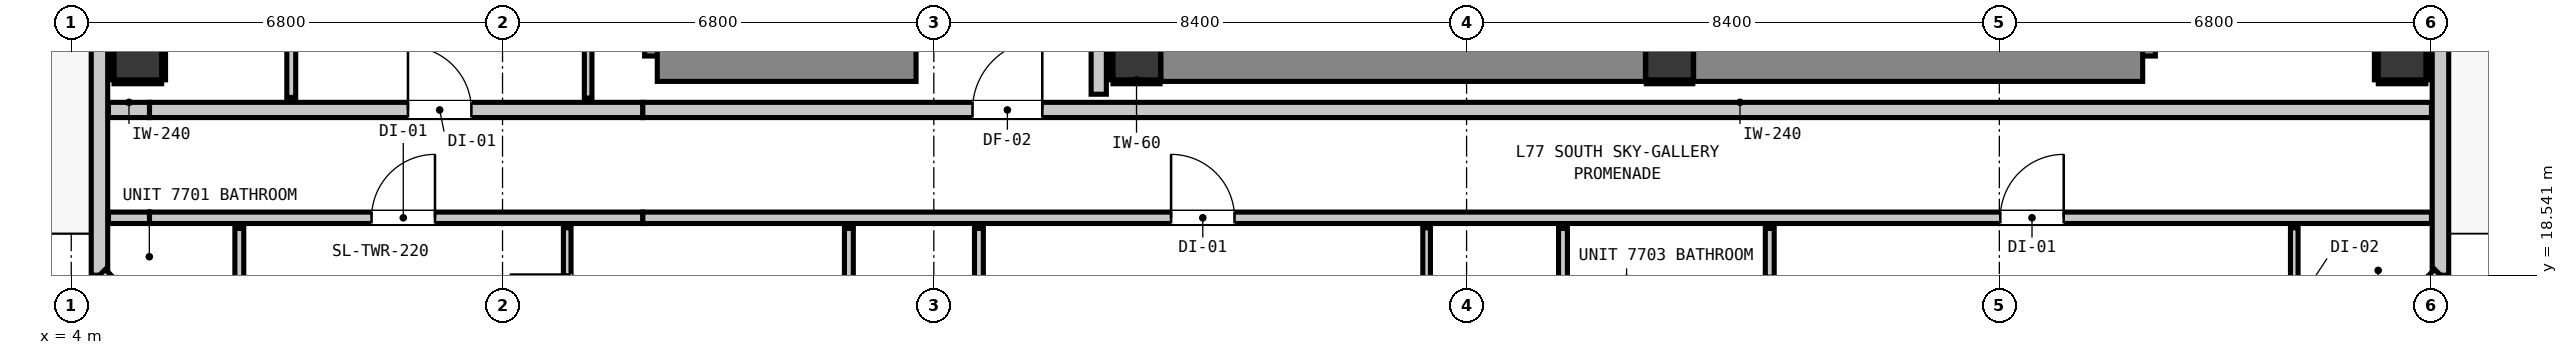
"""IFC4 building model, lengths in metres.
Left out: names, types, materials, properties, quantities, classifications, styles, units other than length and angle.
Written with IfcOpenShell. Run it as: python <this file> out.ifc"""

import sys

from ifc_helpers import new_model, si_unit, direction, frame, frame_2d, origin, origin_2d, place, context, subcontext, project, spatial, rectangle, extrude, element, fill, save


model = new_model("IFC4")
c1 = context("Model", 3, precision=1e-05, world=origin(), true_north=direction((0.0, 1.0)))
c2 = subcontext(c1, "Body", "Model", "MODEL_VIEW")
j1 = project(units=[si_unit("LENGTHUNIT", "METRE"), si_unit("PLANEANGLEUNIT", "RADIAN")], contexts=[c1])
p1 = place(None, origin())
s1 = spatial("IfcSite", under=j1, at=p1, CompositionType="ELEMENT")
p2 = place(p1, origin())
s2 = spatial("IfcBuilding", under=s1, at=p2, CompositionType="ELEMENT")
p3 = place(p2, frame((0.0, 0.0, 265.56)))
s3 = spatial("IfcBuildingStorey", under=s2, at=p3, CompositionType="ELEMENT", Elevation=265.56)
for number, where, z_axis, x_axis in (
    (1, (20.8, 22.0, 0.0), (0.0, 0.0, 1.0), (1.0, 0.0, 0.0)),
    (2, (29.2, 22.0, 0.0), (0.0, 0.0, 1.0), (1.0, 0.0, 0.0)),
):
    element("IfcColumn", number, at=place(p3, frame(where, z_axis=z_axis, x_axis=x_axis)), inside=s3, PredefinedType="COLUMN", context=c2, shape_type="SweptSolid", body=[
        extrude(rectangle(XDim=0.75, YDim=0.75, at=origin_2d()), origin(), (0.0, 0.0, 1.0), 3.32),
    ])
p4 = place(p3, frame((13.44, 22.0, 0.0), z_axis=(0.0, 0.0, 1.0), x_axis=(0.0, 1.0, 0.0)))
e3 = element("IfcWall", 3, at=p4, inside=s3, PredefinedType="SHEAR", context=c2, shape_type="SweptSolid", body=[
    extrude(rectangle(XDim=8.32, YDim=0.8, at=frame_2d((4.16, 0.0))), origin(), (0.0, 0.0, 1.0), 3.32),
])
p5 = place(p3, frame((13.24, 22.0, 0.0), z_axis=(0.0, 0.0, 1.0), x_axis=(1.0, 0.0, 0.0)))
e4 = element("IfcWall", 4, at=p5, inside=s3, PredefinedType="SHEAR", context=c2, shape_type="SweptSolid", body=[
    extrude(rectangle(XDim=4.08, YDim=0.8, at=frame_2d((2.04, 0.0))), origin(), (0.0, 0.0, 1.0), 3.32),
])
p6 = place(p3, frame((36.46, 22.0, 0.0), z_axis=(0.0, 0.0, 1.0), x_axis=(0.0, 1.0, 0.0)))
e5 = element("IfcWall", 5, at=p6, inside=s3, PredefinedType="SHEAR", context=c2, shape_type="SweptSolid", body=[
    extrude(rectangle(XDim=8.32, YDim=0.8, at=frame_2d((4.16, 0.0))), origin(), (0.0, 0.0, 1.0), 3.32),
])
p7 = place(p3, frame((29.58, 22.0, 0.0), z_axis=(0.0, 0.0, 1.0), x_axis=(1.0, 0.0, 0.0)))
e6 = element("IfcWall", 6, at=p7, inside=s3, PredefinedType="SHEAR", context=c2, shape_type="SweptSolid", body=[
    extrude(rectangle(XDim=7.08, YDim=0.8, at=frame_2d((3.54, 0.0))), origin(), (0.0, 0.0, 1.0), 3.32),
])
p8 = place(p3, frame((21.18, 22.0, 0.0), z_axis=(0.0, 0.0, 1.0), x_axis=(1.0, 0.0, 0.0)))
e7 = element("IfcWall", 7, at=p8, inside=s3, PredefinedType="SHEAR", context=c2, shape_type="SweptSolid", body=[
    extrude(rectangle(XDim=7.64, YDim=0.8, at=frame_2d((3.82, 0.0))), origin(), (0.0, 0.0, 1.0), 3.32),
])
for number, where, z_axis, x_axis in (
    (8, (5.05, 22.0, 0.0), (0.0, 0.0, 1.0), (1.0, 0.0, 0.0)),
    (9, (40.75, 22.0, 0.0), (0.0, 0.0, 1.0), (1.0, 0.0, 0.0)),
):
    element("IfcColumn", number, at=place(p3, frame(where, z_axis=z_axis, x_axis=x_axis)), inside=s3, PredefinedType="COLUMN", context=c2, shape_type="SweptSolid", body=[
        extrude(rectangle(XDim=0.75, YDim=0.75, at=origin_2d()), origin(), (0.0, 0.0, 1.0), 3.32),
    ])
p9 = place(p3, frame((4.445, 18.545, 0.0), z_axis=(0.0, 0.0, 1.0), x_axis=(0.0, 1.0, 0.0)))
e10 = element("IfcWall", 10, at=p9, inside=s3, PredefinedType="STANDARD", context=c2, shape_type="SweptSolid", body=[
    extrude(rectangle(XDim=30.31, YDim=0.26, at=frame_2d((15.155, 0.0))), origin(), (0.0, 0.0, 1.0), 3.1),
])
p10 = place(p9, frame((4.434, 0.0, 0.0)))
e11 = element("IfcOpeningElement", 11, at=p10, cuts=e10, PredefinedType="OPENING", context=c2, shape_type="SweptSolid", body=[
    extrude(rectangle(XDim=1.0, YDim=2.15, at=frame_2d((0.5, 1.075))), frame((0.0, 0.14, 0.0), z_axis=(0.0, -1.0, 0.0), x_axis=(1.0, 0.0, 0.0)), (0.0, 0.0, 1.0), 0.28),
])
p11 = place(p9, frame((28.241, 0.0, 0.85)))
e12 = element("IfcOpeningElement", 12, at=p11, cuts=e10, PredefinedType="OPENING", context=c2, shape_type="SweptSolid", body=[
    extrude(rectangle(XDim=1.05, YDim=1.65, at=frame_2d((0.525, 0.825))), frame((0.0, 0.14, 0.0), z_axis=(0.0, -1.0, 0.0), x_axis=(1.0, 0.0, 0.0)), (0.0, 0.0, 1.0), 0.28),
])
p12 = place(p9, frame((15.98, 0.0, 0.85)))
e13 = element("IfcOpeningElement", 13, at=p12, cuts=e10, PredefinedType="OPENING", context=c2, shape_type="SweptSolid", body=[
    extrude(rectangle(XDim=1.05, YDim=1.65, at=frame_2d((0.525, 0.825))), frame((0.0, 0.14, 0.0), z_axis=(0.0, -1.0, 0.0), x_axis=(1.0, 0.0, 0.0)), (0.0, 0.0, 1.0), 0.28),
])
p13 = place(p3, frame((41.355, 48.855, 0.0), z_axis=(0.0, 0.0, 1.0), x_axis=(0.0, -1.0, 0.0)))
e14 = element("IfcWall", 14, at=p13, inside=s3, PredefinedType="STANDARD", context=c2, shape_type="SweptSolid", body=[
    extrude(rectangle(XDim=30.31, YDim=0.26, at=frame_2d((15.155, 0.0))), origin(), (0.0, 0.0, 1.0), 3.1),
])
p14 = place(p13, frame((0.91, 0.0, 0.0)))
e15 = element("IfcOpeningElement", 15, at=p14, cuts=e14, PredefinedType="OPENING", context=c2, shape_type="SweptSolid", body=[
    extrude(rectangle(XDim=1.0, YDim=2.15, at=frame_2d((0.5, 1.075))), frame((0.0, 0.14, 0.0), z_axis=(0.0, -1.0, 0.0), x_axis=(1.0, 0.0, 0.0)), (0.0, 0.0, 1.0), 0.28),
])
p15 = place(p13, frame((3.932, 0.0, 0.85)))
e16 = element("IfcOpeningElement", 16, at=p15, cuts=e14, PredefinedType="OPENING", context=c2, shape_type="SweptSolid", body=[
    extrude(rectangle(XDim=1.05, YDim=1.65, at=frame_2d((0.525, 0.825))), frame((0.0, 0.14, 0.0), z_axis=(0.0, -1.0, 0.0), x_axis=(1.0, 0.0, 0.0)), (0.0, 0.0, 1.0), 0.28),
])
for number, where, z_axis, x_axis in (
    (17, (41.355, 18.545, 0.0), (0.0, 0.0, 1.0), (-0.707, -0.707, 0.0)),
    (18, (6.545, 16.445, 0.0), (0.0, 0.0, 1.0), (-0.707, 0.707, 0.0)),
):
    element("IfcWall", number, at=place(p3, frame(where, z_axis=z_axis, x_axis=x_axis)), inside=s3, PredefinedType="STANDARD", context=c2, shape_type="SweptSolid", body=[
        extrude(rectangle(XDim=2.97, YDim=0.26, at=frame_2d((1.485, 0.0))), origin(), (0.0, 0.0, 1.0), 3.1),
    ])
p16 = place(p3, frame((4.587, 21.15, 0.0), z_axis=(0.0, 0.0, 1.0), x_axis=(1.0, 0.0, 0.0)))
e19 = element("IfcWall", 19, at=p16, inside=s3, PredefinedType="PARTITIONING", context=c2, shape_type="SweptSolid", body=[
    extrude(rectangle(XDim=0.647, YDim=0.24, at=frame_2d((0.323, 0.0))), origin(), (0.0, 0.0, 1.0), 3.1),
])
p17 = place(p3, frame((5.234, 21.15, 0.0), z_axis=(0.0, 0.0, 1.0), x_axis=(1.0, 0.0, 0.0)))
e20 = element("IfcWall", 20, at=p17, inside=s3, PredefinedType="PARTITIONING", context=c2, shape_type="SweptSolid", body=[
    extrude(rectangle(XDim=7.778, YDim=0.24, at=frame_2d((3.889, 0.0))), origin(), (0.0, 0.0, 1.0), 2.477),
])
p18 = place(p17, frame((4.075, 0.0, 0.0)))
e21 = element("IfcOpeningElement", 21, at=p18, cuts=e20, PredefinedType="OPENING", context=c2, shape_type="SweptSolid", body=[
    extrude(rectangle(XDim=1.0, YDim=2.15, at=frame_2d((0.5, 1.075))), frame((0.0, 0.13, 0.0), z_axis=(0.0, -1.0, 0.0), x_axis=(1.0, 0.0, 0.0)), (0.0, 0.0, 1.0), 0.26),
])
p19 = place(p3, frame((13.012, 21.15, 0.0), z_axis=(0.0, 0.0, 1.0), x_axis=(1.0, 0.0, 0.0)))
e22 = element("IfcWall", 22, at=p19, inside=s3, PredefinedType="PARTITIONING", context=c2, shape_type="SweptSolid", body=[
    extrude(rectangle(XDim=28.201, YDim=0.24, at=frame_2d((14.101, 0.0))), origin(), (0.0, 0.0, 1.0), 3.1),
])
p20 = place(p19, frame((5.198, 0.0, 0.0)))
e23 = element("IfcOpeningElement", 23, at=p20, cuts=e22, PredefinedType="OPENING", context=c2, shape_type="SweptSolid", body=[
    extrude(rectangle(XDim=1.1, YDim=2.15, at=frame_2d((0.55, 1.075))), frame((0.0, 0.13, 0.0), z_axis=(0.0, -1.0, 0.0), x_axis=(1.0, 0.0, 0.0)), (0.0, 0.0, 1.0), 0.26),
])
p21 = place(p3, frame((4.587, 19.45, 0.0), z_axis=(0.0, 0.0, 1.0), x_axis=(1.0, 0.0, 0.0)))
e24 = element("IfcWall", 24, at=p21, inside=s3, PredefinedType="PARTITIONING", context=c2, shape_type="SweptSolid", body=[
    extrude(rectangle(XDim=0.647, YDim=0.18, at=frame_2d((0.323, 0.0))), origin(), (0.0, 0.0, 1.0), 3.1),
])
p22 = place(p3, frame((5.234, 19.45, 0.0), z_axis=(0.0, 0.0, 1.0), x_axis=(1.0, 0.0, 0.0)))
e25 = element("IfcWall", 25, at=p22, inside=s3, PredefinedType="PARTITIONING", context=c2, shape_type="SweptSolid", body=[
    extrude(rectangle(XDim=7.778, YDim=0.18, at=frame_2d((3.889, 0.0))), origin(), (0.0, 0.0, 1.0), 2.477),
])
p23 = place(p22, frame((3.501, 0.0, 0.0)))
e26 = element("IfcOpeningElement", 26, at=p23, cuts=e25, PredefinedType="OPENING", context=c2, shape_type="SweptSolid", body=[
    extrude(rectangle(XDim=1.0, YDim=2.15, at=frame_2d((0.5, 1.075))), frame((0.0, 0.1, 0.0), z_axis=(0.0, -1.0, 0.0), x_axis=(1.0, 0.0, 0.0)), (0.0, 0.0, 1.0), 0.2),
])
p24 = place(p3, frame((13.012, 19.45, 0.0), z_axis=(0.0, 0.0, 1.0), x_axis=(1.0, 0.0, 0.0)))
e27 = element("IfcWall", 27, at=p24, inside=s3, PredefinedType="PARTITIONING", context=c2, shape_type="SweptSolid", body=[
    extrude(rectangle(XDim=28.201, YDim=0.18, at=frame_2d((14.101, 0.0))), origin(), (0.0, 0.0, 1.0), 3.1),
])
p25 = place(p24, frame((8.329, 0.0, 0.0)))
e28 = element("IfcOpeningElement", 28, at=p25, cuts=e27, PredefinedType="OPENING", context=c2, shape_type="SweptSolid", body=[
    extrude(rectangle(XDim=1.0, YDim=2.15, at=frame_2d((0.5, 1.075))), frame((0.0, 0.1, 0.0), z_axis=(0.0, -1.0, 0.0), x_axis=(1.0, 0.0, 0.0)), (0.0, 0.0, 1.0), 0.2),
])
p26 = place(p24, frame((21.403, 0.0, 0.0)))
e29 = element("IfcOpeningElement", 29, at=p26, cuts=e27, PredefinedType="OPENING", context=c2, shape_type="SweptSolid", body=[
    extrude(rectangle(XDim=1.0, YDim=2.15, at=frame_2d((0.5, 1.075))), frame((0.0, 0.1, 0.0), z_axis=(0.0, -1.0, 0.0), x_axis=(1.0, 0.0, 0.0)), (0.0, 0.0, 1.0), 0.2),
])
p27 = place(p3, frame((20.2, 21.398, 0.0), z_axis=(0.0, 0.0, 1.0), x_axis=(0.0, 1.0, 0.0)))
e30 = element("IfcWall", 30, at=p27, inside=s3, PredefinedType="PARTITIONING", context=c2, shape_type="SweptSolid", body=[
    extrude(rectangle(XDim=6.754, YDim=0.24, at=frame_2d((3.377, 0.0))), origin(), (0.0, 0.0, 1.0), 3.1),
])
p28 = place(p3, frame((6.65, 16.587, 0.0), z_axis=(0.0, 0.0, 1.0), x_axis=(0.0, 1.0, 0.0)))
e31 = element("IfcWall", 31, at=p28, inside=s3, PredefinedType="PARTITIONING", context=c2, shape_type="SweptSolid", body=[
    extrude(rectangle(XDim=2.695, YDim=0.14, at=frame_2d((1.348, 0.0))), origin(), (0.0, 0.0, 1.0), 3.1),
])
p29 = place(p28, frame((1.008, 0.0, 0.0)))
e32 = element("IfcOpeningElement", 32, at=p29, cuts=e31, PredefinedType="OPENING", context=c2, shape_type="SweptSolid", body=[
    extrude(rectangle(XDim=0.86, YDim=2.02, at=frame_2d((0.43, 1.01))), frame((0.0, 0.08, 0.0), z_axis=(0.0, -1.0, 0.0), x_axis=(1.0, 0.0, 0.0)), (0.0, 0.0, 1.0), 0.16),
])
p30 = place(p3, frame((7.469, 21.348, 0.0), z_axis=(0.0, 0.0, 1.0), x_axis=(0.0, 1.0, 0.0)))
e33 = element("IfcWall", 33, at=p30, inside=s3, PredefinedType="PARTITIONING", context=c2, shape_type="SweptSolid", body=[
    extrude(rectangle(XDim=3.373, YDim=0.14, at=frame_2d((1.687, 0.0))), origin(), (0.0, 0.0, 1.0), 3.1),
])
p31 = place(p30, frame((1.224, 0.0, 0.0)))
e34 = element("IfcOpeningElement", 34, at=p31, cuts=e33, PredefinedType="OPENING", context=c2, shape_type="SweptSolid", body=[
    extrude(rectangle(XDim=0.9, YDim=2.1, at=frame_2d((0.45, 1.05))), frame((0.0, 0.08, 0.0), z_axis=(0.0, -1.0, 0.0), x_axis=(1.0, 0.0, 0.0)), (0.0, 0.0, 1.0), 0.16),
])
p32 = place(p3, frame((16.261, 16.587, 0.0), z_axis=(0.0, 0.0, 1.0), x_axis=(0.0, 1.0, 0.0)))
e35 = element("IfcWall", 35, at=p32, inside=s3, PredefinedType="PARTITIONING", context=c2, shape_type="SweptSolid", body=[
    extrude(rectangle(XDim=2.695, YDim=0.14, at=frame_2d((1.348, 0.0))), origin(), (0.0, 0.0, 1.0), 3.1),
])
p33 = place(p3, frame((18.311, 16.587, 0.0), z_axis=(0.0, 0.0, 1.0), x_axis=(0.0, 1.0, 0.0)))
e36 = element("IfcWall", 36, at=p33, inside=s3, PredefinedType="PARTITIONING", context=c2, shape_type="SweptSolid", body=[
    extrude(rectangle(XDim=2.695, YDim=0.14, at=frame_2d((1.348, 0.0))), origin(), (0.0, 0.0, 1.0), 3.1),
])
p34 = place(p33, frame((1.008, 0.0, 0.0)))
e37 = element("IfcOpeningElement", 37, at=p34, cuts=e36, PredefinedType="OPENING", context=c2, shape_type="SweptSolid", body=[
    extrude(rectangle(XDim=0.86, YDim=2.02, at=frame_2d((0.43, 1.01))), frame((0.0, 0.08, 0.0), z_axis=(0.0, -1.0, 0.0), x_axis=(1.0, 0.0, 0.0)), (0.0, 0.0, 1.0), 0.16),
])
p35 = place(p3, frame((27.52, 16.587, 0.0), z_axis=(0.0, 0.0, 1.0), x_axis=(0.0, 1.0, 0.0)))
e38 = element("IfcWall", 38, at=p35, inside=s3, PredefinedType="PARTITIONING", context=c2, shape_type="SweptSolid", body=[
    extrude(rectangle(XDim=2.695, YDim=0.14, at=frame_2d((1.348, 0.0))), origin(), (0.0, 0.0, 1.0), 3.1),
])
p36 = place(p3, frame((30.78, 16.587, 0.0), z_axis=(0.0, 0.0, 1.0), x_axis=(0.0, 1.0, 0.0)))
e39 = element("IfcWall", 39, at=p36, inside=s3, PredefinedType="PARTITIONING", context=c2, shape_type="SweptSolid", body=[
    extrude(rectangle(XDim=2.695, YDim=0.14, at=frame_2d((1.348, 0.0))), origin(), (0.0, 0.0, 1.0), 3.1),
])
p37 = place(p36, frame((1.088, 0.0, 0.0)))
e40 = element("IfcOpeningElement", 40, at=p37, cuts=e39, PredefinedType="OPENING", context=c2, shape_type="SweptSolid", body=[
    extrude(rectangle(XDim=0.86, YDim=2.02, at=frame_2d((0.43, 1.01))), frame((0.0, 0.08, 0.0), z_axis=(0.0, -1.0, 0.0), x_axis=(1.0, 0.0, 0.0)), (0.0, 0.0, 1.0), 0.16),
])
p38 = place(p3, frame((11.82, 16.587, 0.0), z_axis=(0.0, 0.0, 1.0), x_axis=(0.0, 1.0, 0.0)))
e41 = element("IfcWall", 41, at=p38, inside=s3, PredefinedType="PARTITIONING", context=c2, shape_type="SweptSolid", body=[
    extrude(rectangle(XDim=2.705, YDim=0.12, at=frame_2d((1.353, 0.0))), origin(), (0.0, 0.0, 1.0), 3.1),
])
p39 = place(p38, frame((1.068, 0.0, 0.0)))
e42 = element("IfcOpeningElement", 42, at=p39, cuts=e41, PredefinedType="OPENING", context=c2, shape_type="SweptSolid", body=[
    extrude(rectangle(XDim=0.9, YDim=2.1, at=frame_2d((0.45, 1.05))), frame((0.0, 0.07, 0.0), z_axis=(0.0, -1.0, 0.0), x_axis=(1.0, 0.0, 0.0)), (0.0, 0.0, 1.0), 0.14),
])
p40 = place(p3, frame((12.15, 21.338, 0.0), z_axis=(0.0, 0.0, 1.0), x_axis=(0.0, 1.0, 0.0)))
e43 = element("IfcWall", 43, at=p40, inside=s3, PredefinedType="PARTITIONING", context=c2, shape_type="SweptSolid", body=[
    extrude(rectangle(XDim=8.324, YDim=0.12, at=frame_2d((4.162, 0.0))), origin(), (0.0, 0.0, 1.0), 3.1),
])
p41 = place(p3, frame((25.37, 16.587, 0.0), z_axis=(0.0, 0.0, 1.0), x_axis=(0.0, 1.0, 0.0)))
e44 = element("IfcWall", 44, at=p41, inside=s3, PredefinedType="PARTITIONING", context=c2, shape_type="SweptSolid", body=[
    extrude(rectangle(XDim=2.705, YDim=0.12, at=frame_2d((1.353, 0.0))), origin(), (0.0, 0.0, 1.0), 3.1),
])
p42 = place(p41, frame((0.988, 0.0, 0.0)))
e45 = element("IfcOpeningElement", 45, at=p42, cuts=e44, PredefinedType="OPENING", context=c2, shape_type="SweptSolid", body=[
    extrude(rectangle(XDim=0.9, YDim=2.1, at=frame_2d((0.45, 1.05))), frame((0.0, 0.07, 0.0), z_axis=(0.0, -1.0, 0.0), x_axis=(1.0, 0.0, 0.0)), (0.0, 0.0, 1.0), 0.14),
])
p43 = place(p3, frame((39.05, 16.587, 0.0), z_axis=(0.0, 0.0, 1.0), x_axis=(0.0, 1.0, 0.0)))
e46 = element("IfcWall", 46, at=p43, inside=s3, PredefinedType="PARTITIONING", context=c2, shape_type="SweptSolid", body=[
    extrude(rectangle(XDim=2.705, YDim=0.12, at=frame_2d((1.353, 0.0))), origin(), (0.0, 0.0, 1.0), 3.1),
])
p44 = place(p43, frame((0.988, 0.0, 0.0)))
e47 = element("IfcOpeningElement", 47, at=p44, cuts=e46, PredefinedType="OPENING", context=c2, shape_type="SweptSolid", body=[
    extrude(rectangle(XDim=0.9, YDim=2.1, at=frame_2d((0.45, 1.05))), frame((0.0, 0.07, 0.0), z_axis=(0.0, -1.0, 0.0), x_axis=(1.0, 0.0, 0.0)), (0.0, 0.0, 1.0), 0.14),
])
p45 = place(p3, frame((20.425, 21.593, 0.0), z_axis=(0.0, 0.0, 1.0), x_axis=(1.0, 0.0, 0.0)))
e48 = element("IfcWall", 48, at=p45, inside=s3, PredefinedType="PARTITIONING", context=c2, shape_type="SweptSolid", body=[
    extrude(rectangle(XDim=0.742, YDim=0.06, at=frame_2d((0.371, 0.0))), origin(), (0.0, 0.0, 1.0), 1.45),
])
p46 = place(p3, frame((20.393, 21.625, 0.0), z_axis=(0.0, 0.0, 1.0), x_axis=(0.0, 1.0, 0.0)))
e49 = element("IfcWall", 49, at=p46, inside=s3, PredefinedType="PARTITIONING", context=c2, shape_type="SweptSolid", body=[
    extrude(rectangle(XDim=0.75, YDim=0.06, at=frame_2d((0.375, 0.0))), origin(), (0.0, 0.0, 1.0), 1.45),
])
p47 = place(p3, frame((28.833, 21.593, 0.0), z_axis=(0.0, 0.0, 1.0), x_axis=(1.0, 0.0, 0.0)))
e50 = element("IfcWall", 50, at=p47, inside=s3, PredefinedType="PARTITIONING", context=c2, shape_type="SweptSolid", body=[
    extrude(rectangle(XDim=0.734, YDim=0.06, at=frame_2d((0.367, 0.0))), origin(), (0.0, 0.0, 1.0), 1.45),
])
for number, where, z_axis, x_axis in (
    (51, (4.675, 21.593, 0.0), (0.0, 0.0, 1.0), (1.0, 0.0, 0.0)),
    (52, (4.643, 21.625, 0.0), (0.0, 0.0, 1.0), (0.0, 1.0, 0.0)),
    (53, (5.457, 21.625, 0.0), (0.0, 0.0, 1.0), (0.0, 1.0, 0.0)),
    (54, (40.375, 21.593, 0.0), (0.0, 0.0, 1.0), (1.0, 0.0, 0.0)),
    (55, (40.343, 21.625, 0.0), (0.0, 0.0, 1.0), (0.0, 1.0, 0.0)),
    (56, (41.157, 21.625, 0.0), (0.0, 0.0, 1.0), (0.0, 1.0, 0.0)),
):
    element("IfcWall", number, at=place(p3, frame(where, z_axis=z_axis, x_axis=x_axis)), inside=s3, PredefinedType="PARTITIONING", context=c2, shape_type="SweptSolid", body=[
        extrude(rectangle(XDim=0.75, YDim=0.06, at=frame_2d((0.375, 0.0))), origin(), (0.0, 0.0, 1.0), 1.45),
    ])
p48 = place(p20, origin())
e57 = element("IfcDoor", 57, at=p48, inside=s3, OperationType="SINGLE_SWING_RIGHT", PredefinedType="DOOR", context=c2, shape_type="SweptSolid", body=[
    extrude(rectangle(XDim=1.1, YDim=2.15, at=frame_2d((0.55, 1.075))), frame((0.0, 0.025, 0.0), z_axis=(0.0, -1.0, 0.0), x_axis=(1.0, 0.0, 0.0)), (0.0, 0.0, 1.0), 0.05),
])
fill(e23, e57)
p49 = place(p23, origin())
e58 = element("IfcDoor", 58, at=p49, inside=s3, OperationType="SINGLE_SWING_RIGHT", PredefinedType="DOOR", context=c2, shape_type="SweptSolid", body=[
    extrude(rectangle(XDim=1.0, YDim=2.15, at=frame_2d((0.5, 1.075))), frame((0.0, 0.025, 0.0), z_axis=(0.0, -1.0, 0.0), x_axis=(1.0, 0.0, 0.0)), (0.0, 0.0, 1.0), 0.05),
])
fill(e26, e58)
p50 = place(p39, origin())
e59 = element("IfcDoor", 59, at=p50, inside=s3, OperationType="SINGLE_SWING_RIGHT", PredefinedType="DOOR", context=c2, shape_type="SweptSolid", body=[
    extrude(rectangle(XDim=0.9, YDim=2.1, at=frame_2d((0.45, 1.05))), frame((0.0, 0.025, 0.0), z_axis=(0.0, -1.0, 0.0), x_axis=(1.0, 0.0, 0.0)), (0.0, 0.0, 1.0), 0.05),
])
fill(e42, e59)
p51 = place(p25, origin())
e60 = element("IfcDoor", 60, at=p51, inside=s3, OperationType="SINGLE_SWING_LEFT", PredefinedType="DOOR", context=c2, shape_type="SweptSolid", body=[
    extrude(rectangle(XDim=1.0, YDim=2.15, at=frame_2d((0.5, 1.075))), frame((0.0, 0.025, 0.0), z_axis=(0.0, -1.0, 0.0), x_axis=(1.0, 0.0, 0.0)), (0.0, 0.0, 1.0), 0.05),
])
fill(e28, e60)
p52 = place(p26, origin())
e61 = element("IfcDoor", 61, at=p52, inside=s3, OperationType="SINGLE_SWING_RIGHT", PredefinedType="DOOR", context=c2, shape_type="SweptSolid", body=[
    extrude(rectangle(XDim=1.0, YDim=2.15, at=frame_2d((0.5, 1.075))), frame((0.0, 0.025, 0.0), z_axis=(0.0, -1.0, 0.0), x_axis=(1.0, 0.0, 0.0)), (0.0, 0.0, 1.0), 0.05),
])
fill(e29, e61)
p53 = place(p18, origin())
e62 = element("IfcDoor", 62, at=p53, inside=s3, OperationType="SINGLE_SWING_LEFT", PredefinedType="DOOR", context=c2, shape_type="SweptSolid", body=[
    extrude(rectangle(XDim=1.0, YDim=2.15, at=frame_2d((0.5, 1.075))), frame((0.0, 0.025, 0.0), z_axis=(0.0, -1.0, 0.0), x_axis=(1.0, 0.0, 0.0)), (0.0, 0.0, 1.0), 0.05),
])
fill(e21, e62)
save(model, sys.argv[1])
